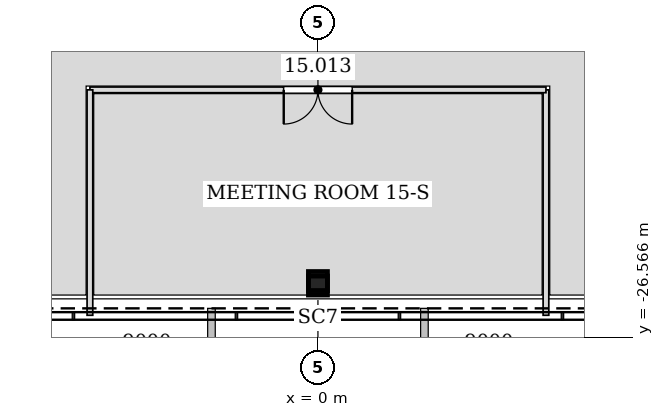
"""IFC4 building model, lengths in metres.
Left out: names, types, materials, properties, quantities, classifications, styles, units other than length and angle.
Written with IfcOpenShell. Run it as: python <this file> out.ifc"""

import sys

from ifc_helpers import new_model, si_unit, direction, frame, frame_2d, origin, origin_2d, place, context, subcontext, project, spatial, rectangle, hollow_rectangle, extrude, element, fill, save


model = new_model("IFC4")
c1 = context("Model", 3, precision=1e-05, world=origin(), true_north=direction((0.0, 1.0)))
c2 = subcontext(c1, "Body", "Model", "MODEL_VIEW")
j1 = project(units=[si_unit("LENGTHUNIT", "METRE"), si_unit("PLANEANGLEUNIT", "RADIAN")], contexts=[c1])
p1 = place(None, origin())
s1 = spatial("IfcSite", under=j1, at=p1, CompositionType="ELEMENT")
p2 = place(p1, origin())
s2 = spatial("IfcBuilding", under=s1, at=p2, CompositionType="ELEMENT")
p3 = place(p2, frame((0.0, 0.0, 70.8)))
s3 = spatial("IfcBuildingStorey", under=s2, at=p3, CompositionType="ELEMENT", Elevation=70.8)
p4 = place(p3, frame((0.0, -25.212, 0.0), z_axis=(0.0, 0.028297679255, 0.99959954049), x_axis=(-1.0, 0.0, 0.0)))
e1 = element("IfcColumn", 1, at=p4, inside=s3, PredefinedType="COLUMN", context=c2, shape_type="SweptSolid", body=[
    extrude(hollow_rectangle(XDim=0.5, YDim=0.5, WallThickness=0.025, at=origin_2d()), origin(), (0.0, 0.0, 1.0), 4.202),
])
p5 = place(p3, frame((6.0, -25.994, 0.0), z_axis=(0.0, 0.0, 1.0), x_axis=(0.0, 1.0, 0.0)))
e2 = element("IfcWall", 2, at=p5, inside=s3, PredefinedType="PARTITIONING", context=c2, shape_type="SweptSolid", body=[
    extrude(rectangle(XDim=5.932, YDim=0.15, at=frame_2d((2.966, 0.0))), origin(), (0.0, 0.0, 1.0), 3.423),
])
p6 = place(p3, frame((6.0, -20.062, 0.0), z_axis=(0.0, 0.0, 1.0), x_axis=(-1.0, 0.0, 0.0)))
e3 = element("IfcWall", 3, at=p6, inside=s3, PredefinedType="PARTITIONING", context=c2, shape_type="SweptSolid", body=[
    extrude(rectangle(XDim=12.0, YDim=0.15, at=frame_2d((6.0, 0.0))), origin(), (0.0, 0.0, 1.0), 3.065),
])
p7 = place(p6, frame((5.1, 0.0, 0.0)))
e4 = element("IfcOpeningElement", 4, at=p7, cuts=e3, PredefinedType="OPENING", context=c2, shape_type="SweptSolid", body=[
    extrude(rectangle(XDim=1.8, YDim=2.4, at=frame_2d((0.9, 1.2))), frame((0.0, 0.085, 0.0), z_axis=(0.0, -1.0, 0.0), x_axis=(1.0, 0.0, 0.0)), (0.0, 0.0, 1.0), 0.17),
])
p8 = place(p3, frame((-6.0, -20.062, 0.0), z_axis=(0.0, 0.0, 1.0), x_axis=(0.0, -1.0, 0.0)))
e5 = element("IfcWall", 5, at=p8, inside=s3, PredefinedType="PARTITIONING", context=c2, shape_type="SweptSolid", body=[
    extrude(rectangle(XDim=5.932, YDim=0.15, at=frame_2d((2.966, 0.0))), origin(), (0.0, 0.0, 1.0), 3.423),
])
p9 = place(p7, origin())
e6 = element("IfcDoor", 6, at=p9, inside=s3, OperationType="DOUBLE_DOOR_SINGLE_SWING", PredefinedType="DOOR", context=c2, shape_type="SweptSolid", body=[
    extrude(rectangle(XDim=1.8, YDim=2.4, at=frame_2d((0.9, 1.2))), frame((0.0, 0.025, 0.0), z_axis=(0.0, -1.0, 0.0), x_axis=(1.0, 0.0, 0.0)), (0.0, 0.0, 1.0), 0.05),
])
fill(e4, e6)
save(model, sys.argv[1])
